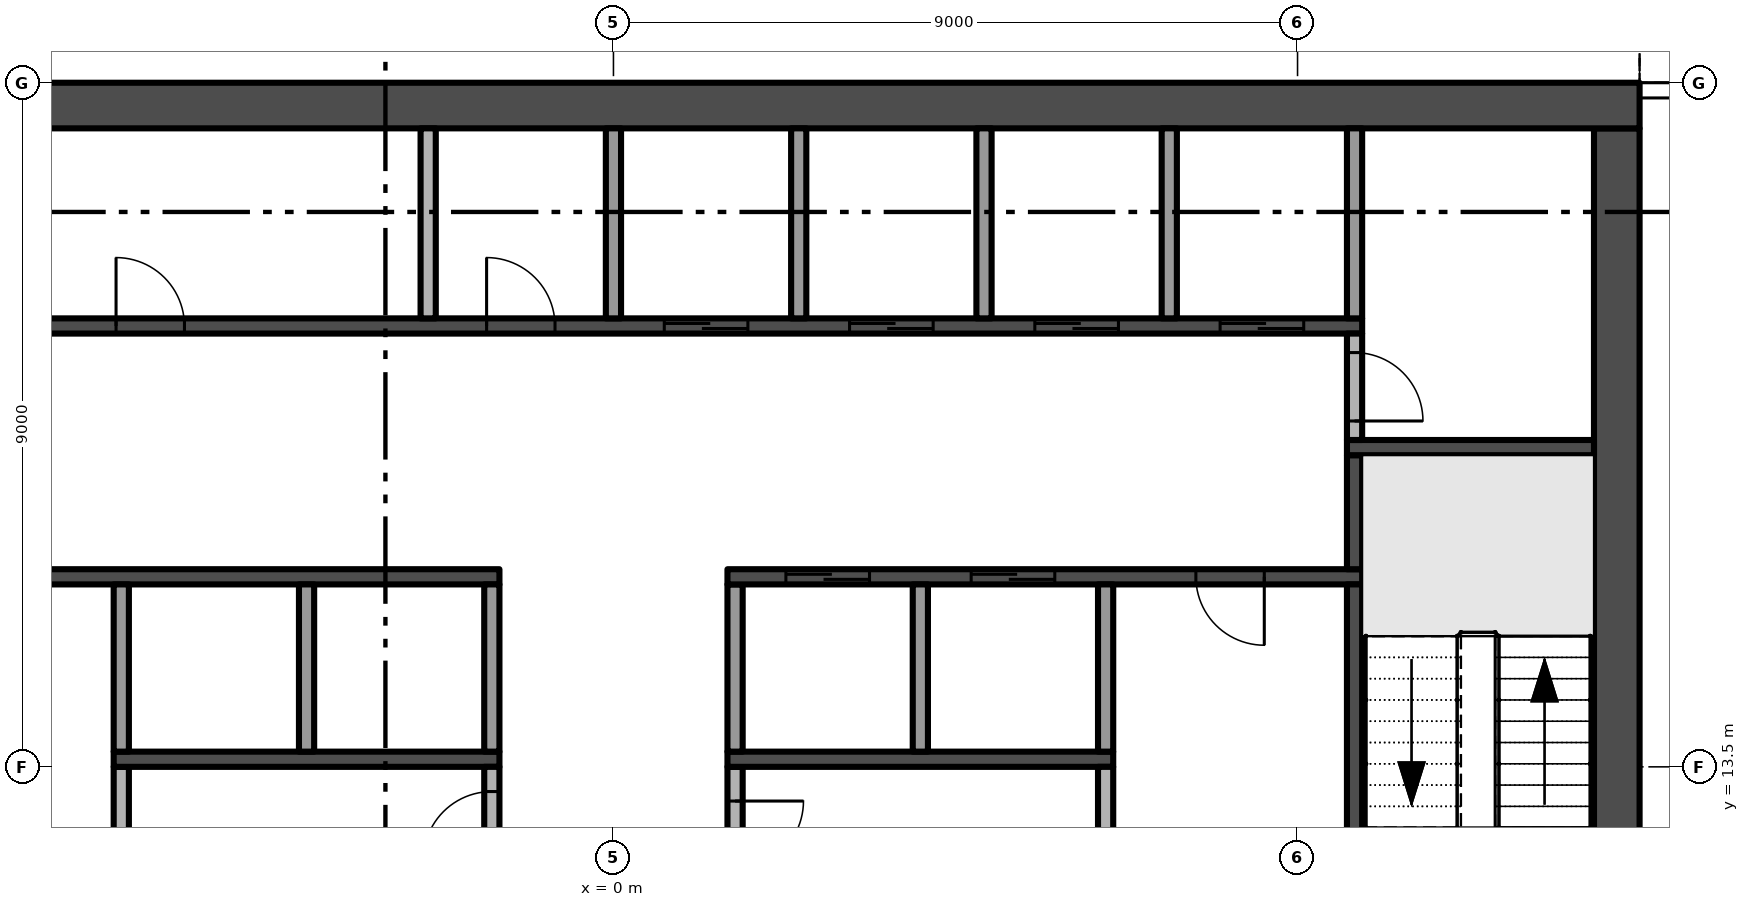
"""IFC4 building model, lengths in metres.
Left out: names, types, materials, properties, quantities, classifications, styles, units other than length and angle.
Written with IfcOpenShell. Run it as: python <this file> out.ifc"""

import sys

from ifc_helpers import new_model, si_unit, direction, frame, frame_2d, origin, place, context, subcontext, project, spatial, polyline, rectangle, outline, extrude, element, fill, save


model = new_model("IFC4")
c1 = context("Model", 3, precision=1e-05, world=origin(), true_north=direction((0.0, 1.0)))
c2 = subcontext(c1, "Body", "Model", "MODEL_VIEW")
j1 = project(units=[si_unit("LENGTHUNIT", "METRE"), si_unit("PLANEANGLEUNIT", "RADIAN")], contexts=[c1])
p1 = place(None, origin())
s1 = spatial("IfcSite", under=j1, at=p1, CompositionType="ELEMENT")
p2 = place(p1, origin())
s2 = spatial("IfcBuilding", under=s1, at=p2, CompositionType="ELEMENT")
p3 = place(p2, frame((0.0, 0.0, 284.4)))
s3 = spatial("IfcBuildingStorey", under=s2, at=p3, CompositionType="ELEMENT", Elevation=284.4)
p4 = place(p3, frame((13.2, 5.1, -0.3), z_axis=(0.0, 0.0, 1.0), x_axis=(0.0, 1.0, 0.0)))
e1 = element("IfcWall", 1, at=p4, inside=s3, PredefinedType="SHEAR", context=c2, shape_type="SweptSolid", body=[
    extrude(rectangle(XDim=16.8, YDim=0.6, at=frame_2d((8.4, 0.0))), origin(), (0.0, 0.0, 1.0), 5.0),
])
p5 = place(p4, frame((6.3, 0.0, 0.3)))
e2 = element("IfcOpeningElement", 2, at=p5, cuts=e1, PredefinedType="OPENING", context=c2, shape_type="SweptSolid", body=[
    extrude(rectangle(XDim=1.2, YDim=2.2, at=frame_2d((0.6, 1.1))), frame((0.0, 0.31, 0.0), z_axis=(0.0, -1.0, 0.0), x_axis=(1.0, 0.0, 0.0)), (0.0, 0.0, 1.0), 0.62),
])
p6 = place(p3, frame((13.5, 22.2, -0.3), z_axis=(0.0, 0.0, 1.0), x_axis=(-1.0, 0.0, 0.0)))
e3 = element("IfcWall", 3, at=p6, inside=s3, PredefinedType="SHEAR", context=c2, shape_type="SweptSolid", body=[
    extrude(rectangle(XDim=27.0, YDim=0.6, at=frame_2d((13.5, 0.0))), origin(), (0.0, 0.0, 1.0), 5.0),
])
p7 = place(p3, origin())
e4 = element("IfcWall", 4, at=p7, inside=s3, PredefinedType="USERDEFINED", context=c2, shape_type="SweptSolid", body=[
    extrude(outline(polyline([(22.5, 25.149), (21.0, 24.488), (19.5, 23.755), (18.0, 23.231), (16.875, 23.1), (16.5, 23.115), (15.0, 23.451), (13.5, 24.112), (13.399, 23.883), (14.921, 23.213), (16.467, 22.866), (16.885, 22.849), (18.056, 22.986), (19.596, 23.524), (21.105, 24.261), (22.601, 24.92), (22.5, 25.149)])), origin(), (0.0, 0.0, 1.0), 0.9),
])
p8 = place(p3, frame((-1.5, 16.0, 0.0), z_axis=(0.0, 0.0, 1.0), x_axis=(-1.0, 0.0, 0.0)))
e5 = element("IfcWall", 5, at=p8, inside=s3, PredefinedType="SHEAR", context=c2, shape_type="SweptSolid", body=[
    extrude(rectangle(XDim=8.35, YDim=0.2, at=frame_2d((4.175, 0.0))), origin(), (0.0, 0.0, 1.0), 4.7),
])
p9 = place(p8, frame((6.162, 0.0, 0.0)))
e6 = element("IfcOpeningElement", 6, at=p9, cuts=e5, PredefinedType="OPENING", context=c2, shape_type="SweptSolid", body=[
    extrude(rectangle(XDim=0.9, YDim=2.1, at=frame_2d((0.45, 1.05))), frame((0.0, 0.11, 0.0), z_axis=(0.0, -1.0, 0.0), x_axis=(1.0, 0.0, 0.0)), (0.0, 0.0, 1.0), 0.22),
])
p10 = place(p3, frame((-9.85, 19.3, 0.0), z_axis=(0.0, 0.0, 1.0), x_axis=(1.0, 0.0, 0.0)))
e7 = element("IfcWall", 7, at=p10, inside=s3, PredefinedType="SHEAR", context=c2, shape_type="SweptSolid", body=[
    extrude(rectangle(XDim=19.7, YDim=0.2, at=frame_2d((9.85, 0.0))), origin(), (0.0, 0.0, 1.0), 4.7),
])
p11 = place(p10, frame((10.519, 0.0, 0.0)))
e8 = element("IfcOpeningElement", 8, at=p11, cuts=e7, PredefinedType="OPENING", context=c2, shape_type="SweptSolid", body=[
    extrude(rectangle(XDim=1.1, YDim=2.1, at=frame_2d((0.55, 1.05))), frame((0.0, 0.11, 0.0), z_axis=(0.0, -1.0, 0.0), x_axis=(1.0, 0.0, 0.0)), (0.0, 0.0, 1.0), 0.22),
])
p12 = place(p10, frame((12.956, 0.0, 0.0)))
e9 = element("IfcOpeningElement", 9, at=p12, cuts=e7, PredefinedType="OPENING", context=c2, shape_type="SweptSolid", body=[
    extrude(rectangle(XDim=1.1, YDim=2.1, at=frame_2d((0.55, 1.05))), frame((0.0, 0.11, 0.0), z_axis=(0.0, -1.0, 0.0), x_axis=(1.0, 0.0, 0.0)), (0.0, 0.0, 1.0), 0.22),
])
p13 = place(p10, frame((15.394, 0.0, 0.0)))
e10 = element("IfcOpeningElement", 10, at=p13, cuts=e7, PredefinedType="OPENING", context=c2, shape_type="SweptSolid", body=[
    extrude(rectangle(XDim=1.1, YDim=2.1, at=frame_2d((0.55, 1.05))), frame((0.0, 0.11, 0.0), z_axis=(0.0, -1.0, 0.0), x_axis=(1.0, 0.0, 0.0)), (0.0, 0.0, 1.0), 0.22),
])
p14 = place(p10, frame((17.831, 0.0, 0.0)))
e11 = element("IfcOpeningElement", 11, at=p14, cuts=e7, PredefinedType="OPENING", context=c2, shape_type="SweptSolid", body=[
    extrude(rectangle(XDim=1.1, YDim=2.1, at=frame_2d((0.55, 1.05))), frame((0.0, 0.11, 0.0), z_axis=(0.0, -1.0, 0.0), x_axis=(1.0, 0.0, 0.0)), (0.0, 0.0, 1.0), 0.22),
])
p15 = place(p10, frame((3.306, 0.0, 0.0)))
e12 = element("IfcOpeningElement", 12, at=p15, cuts=e7, PredefinedType="OPENING", context=c2, shape_type="SweptSolid", body=[
    extrude(rectangle(XDim=0.9, YDim=2.1, at=frame_2d((0.45, 1.05))), frame((0.0, 0.11, 0.0), z_axis=(0.0, -1.0, 0.0), x_axis=(1.0, 0.0, 0.0)), (0.0, 0.0, 1.0), 0.22),
])
p16 = place(p10, frame((8.181, 0.0, 0.0)))
e13 = element("IfcOpeningElement", 13, at=p16, cuts=e7, PredefinedType="OPENING", context=c2, shape_type="SweptSolid", body=[
    extrude(rectangle(XDim=0.9, YDim=2.1, at=frame_2d((0.45, 1.05))), frame((0.0, 0.11, 0.0), z_axis=(0.0, -1.0, 0.0), x_axis=(1.0, 0.0, 0.0)), (0.0, 0.0, 1.0), 0.22),
])
p17 = place(p3, frame((-6.475, 11.95, 0.0), z_axis=(0.0, 0.0, 1.0), x_axis=(0.0, 1.0, 0.0)))
e14 = element("IfcWall", 14, at=p17, inside=s3, PredefinedType="PARTITIONING", context=c2, shape_type="SweptSolid", body=[
    extrude(rectangle(XDim=1.55, YDim=0.2, at=frame_2d((0.775, 0.0))), origin(), (0.0, 0.0, 1.0), 4.7),
])
p18 = place(p3, frame((-6.575, 13.6, 0.0), z_axis=(0.0, 0.0, 1.0), x_axis=(1.0, 0.0, 0.0)))
e15 = element("IfcWall", 15, at=p18, inside=s3, PredefinedType="SHEAR", context=c2, shape_type="SweptSolid", body=[
    extrude(rectangle(XDim=5.075, YDim=0.2, at=frame_2d((2.538, 0.0))), origin(), (0.0, 0.0, 1.0), 4.7),
])
for number, where, z_axis, x_axis in (
    (16, (-6.475, 13.7, 0.0), (0.0, 0.0, 1.0), (0.0, 1.0, 0.0)),
    (17, (-4.037, 13.7, 0.0), (0.0, 0.0, 1.0), (0.0, 1.0, 0.0)),
):
    element("IfcWall", number, at=place(p3, frame(where, z_axis=z_axis, x_axis=x_axis)), inside=s3, PredefinedType="PARTITIONING", context=c2, shape_type="SweptSolid", body=[
        extrude(rectangle(XDim=2.2, YDim=0.2, at=frame_2d((1.1, 0.0))), origin(), (0.0, 0.0, 1.0), 4.7),
    ])
p19 = place(p3, frame((-2.438, 19.4, 0.0), z_axis=(0.0, 0.0, 1.0), x_axis=(0.0, 1.0, 0.0)))
e18 = element("IfcWall", 18, at=p19, inside=s3, PredefinedType="PARTITIONING", context=c2, shape_type="SweptSolid", body=[
    extrude(rectangle(XDim=2.5, YDim=0.2, at=frame_2d((1.25, 0.0))), origin(), (0.0, 0.0, 1.0), 4.7),
])
p20 = place(p3, frame((-1.6, 11.95, 0.0), z_axis=(0.0, 0.0, 1.0), x_axis=(0.0, 1.0, 0.0)))
e19 = element("IfcWall", 19, at=p20, inside=s3, PredefinedType="PARTITIONING", context=c2, shape_type="SweptSolid", body=[
    extrude(rectangle(XDim=1.55, YDim=0.2, at=frame_2d((0.775, 0.0))), origin(), (0.0, 0.0, 1.0), 4.7),
])
p21 = place(p20, frame((0.325, 0.0, 0.0)))
e20 = element("IfcOpeningElement", 20, at=p21, cuts=e19, PredefinedType="OPENING", context=c2, shape_type="SweptSolid", body=[
    extrude(rectangle(XDim=0.9, YDim=2.1, at=frame_2d((0.45, 1.05))), frame((0.0, 0.11, 0.0), z_axis=(0.0, -1.0, 0.0), x_axis=(1.0, 0.0, 0.0)), (0.0, 0.0, 1.0), 0.22),
])
p22 = place(p3, frame((-1.6, 13.7, 0.0), z_axis=(0.0, 0.0, 1.0), x_axis=(0.0, 1.0, 0.0)))
e21 = element("IfcWall", 21, at=p22, inside=s3, PredefinedType="PARTITIONING", context=c2, shape_type="SweptSolid", body=[
    extrude(rectangle(XDim=2.2, YDim=0.2, at=frame_2d((1.1, 0.0))), origin(), (0.0, 0.0, 1.0), 4.7),
])
p23 = place(p3, frame((0.0, 19.4, 0.0), z_axis=(0.0, 0.0, 1.0), x_axis=(0.0, 1.0, 0.0)))
e22 = element("IfcWall", 22, at=p23, inside=s3, PredefinedType="PARTITIONING", context=c2, shape_type="SweptSolid", body=[
    extrude(rectangle(XDim=2.5, YDim=0.2, at=frame_2d((1.25, 0.0))), origin(), (0.0, 0.0, 1.0), 4.7),
])
p24 = place(p3, frame((1.6, 13.5, 0.0), z_axis=(0.0, 0.0, 1.0), x_axis=(0.0, -1.0, 0.0)))
e23 = element("IfcWall", 23, at=p24, inside=s3, PredefinedType="PARTITIONING", context=c2, shape_type="SweptSolid", body=[
    extrude(rectangle(XDim=1.8, YDim=0.2, at=frame_2d((0.9, 0.0))), origin(), (0.0, 0.0, 1.0), 4.7),
])
p25 = place(p24, frame((0.45, 0.0, 0.0)))
e24 = element("IfcOpeningElement", 24, at=p25, cuts=e23, PredefinedType="OPENING", context=c2, shape_type="SweptSolid", body=[
    extrude(rectangle(XDim=0.9, YDim=2.1, at=frame_2d((0.45, 1.05))), frame((0.0, 0.11, 0.0), z_axis=(0.0, -1.0, 0.0), x_axis=(1.0, 0.0, 0.0)), (0.0, 0.0, 1.0), 0.22),
])
p26 = place(p3, frame((1.5, 13.6, 0.0), z_axis=(0.0, 0.0, 1.0), x_axis=(1.0, 0.0, 0.0)))
e25 = element("IfcWall", 25, at=p26, inside=s3, PredefinedType="SHEAR", context=c2, shape_type="SweptSolid", body=[
    extrude(rectangle(XDim=5.075, YDim=0.2, at=frame_2d((2.538, 0.0))), origin(), (0.0, 0.0, 1.0), 4.7),
])
p27 = place(p3, frame((1.6, 13.7, 0.0), z_axis=(0.0, 0.0, 1.0), x_axis=(0.0, 1.0, 0.0)))
e26 = element("IfcWall", 26, at=p27, inside=s3, PredefinedType="PARTITIONING", context=c2, shape_type="SweptSolid", body=[
    extrude(rectangle(XDim=2.2, YDim=0.2, at=frame_2d((1.1, 0.0))), origin(), (0.0, 0.0, 1.0), 4.7),
])
p28 = place(p3, frame((9.85, 16.0, 0.0), z_axis=(0.0, 0.0, 1.0), x_axis=(-1.0, 0.0, 0.0)))
e27 = element("IfcWall", 27, at=p28, inside=s3, PredefinedType="SHEAR", context=c2, shape_type="SweptSolid", body=[
    extrude(rectangle(XDim=8.35, YDim=0.2, at=frame_2d((4.175, 0.0))), origin(), (0.0, 0.0, 1.0), 4.7),
])
p29 = place(p28, frame((6.481, 0.0, 0.0)))
e28 = element("IfcOpeningElement", 28, at=p29, cuts=e27, PredefinedType="OPENING", context=c2, shape_type="SweptSolid", body=[
    extrude(rectangle(XDim=1.1, YDim=2.1, at=frame_2d((0.55, 1.05))), frame((0.0, 0.11, 0.0), z_axis=(0.0, -1.0, 0.0), x_axis=(1.0, 0.0, 0.0)), (0.0, 0.0, 1.0), 0.22),
])
p30 = place(p28, frame((4.044, 0.0, 0.0)))
e29 = element("IfcOpeningElement", 29, at=p30, cuts=e27, PredefinedType="OPENING", context=c2, shape_type="SweptSolid", body=[
    extrude(rectangle(XDim=1.1, YDim=2.1, at=frame_2d((0.55, 1.05))), frame((0.0, 0.11, 0.0), z_axis=(0.0, -1.0, 0.0), x_axis=(1.0, 0.0, 0.0)), (0.0, 0.0, 1.0), 0.22),
])
p31 = place(p28, frame((1.288, 0.0, 0.0)))
e30 = element("IfcOpeningElement", 30, at=p31, cuts=e27, PredefinedType="OPENING", context=c2, shape_type="SweptSolid", body=[
    extrude(rectangle(XDim=0.9, YDim=2.1, at=frame_2d((0.45, 1.05))), frame((0.0, 0.11, 0.0), z_axis=(0.0, -1.0, 0.0), x_axis=(1.0, 0.0, 0.0)), (0.0, 0.0, 1.0), 0.22),
])
p32 = place(p3, frame((2.438, 19.4, 0.0), z_axis=(0.0, 0.0, 1.0), x_axis=(0.0, 1.0, 0.0)))
e31 = element("IfcWall", 31, at=p32, inside=s3, PredefinedType="PARTITIONING", context=c2, shape_type="SweptSolid", body=[
    extrude(rectangle(XDim=2.5, YDim=0.2, at=frame_2d((1.25, 0.0))), origin(), (0.0, 0.0, 1.0), 4.7),
])
p33 = place(p3, frame((4.037, 13.7, 0.0), z_axis=(0.0, 0.0, 1.0), x_axis=(0.0, 1.0, 0.0)))
e32 = element("IfcWall", 32, at=p33, inside=s3, PredefinedType="PARTITIONING", context=c2, shape_type="SweptSolid", body=[
    extrude(rectangle(XDim=2.2, YDim=0.2, at=frame_2d((1.1, 0.0))), origin(), (0.0, 0.0, 1.0), 4.7),
])
p34 = place(p3, frame((4.875, 19.4, 0.0), z_axis=(0.0, 0.0, 1.0), x_axis=(0.0, 1.0, 0.0)))
e33 = element("IfcWall", 33, at=p34, inside=s3, PredefinedType="PARTITIONING", context=c2, shape_type="SweptSolid", body=[
    extrude(rectangle(XDim=2.5, YDim=0.2, at=frame_2d((1.25, 0.0))), origin(), (0.0, 0.0, 1.0), 4.7),
])
p35 = place(p3, frame((6.475, 12.3, 0.0), z_axis=(0.0, 0.0, 1.0), x_axis=(0.0, 1.0, 0.0)))
e34 = element("IfcWall", 34, at=p35, inside=s3, PredefinedType="PARTITIONING", context=c2, shape_type="SweptSolid", body=[
    extrude(rectangle(XDim=1.2, YDim=0.2, at=frame_2d((0.6, 0.0))), origin(), (0.0, 0.0, 1.0), 4.7),
])
p36 = place(p3, frame((6.475, 13.7, 0.0), z_axis=(0.0, 0.0, 1.0), x_axis=(0.0, 1.0, 0.0)))
e35 = element("IfcWall", 35, at=p36, inside=s3, PredefinedType="PARTITIONING", context=c2, shape_type="SweptSolid", body=[
    extrude(rectangle(XDim=2.2, YDim=0.2, at=frame_2d((1.1, 0.0))), origin(), (0.0, 0.0, 1.0), 4.7),
])
p37 = place(p3, frame((7.312, 19.4, 0.0), z_axis=(0.0, 0.0, 1.0), x_axis=(0.0, 1.0, 0.0)))
e36 = element("IfcWall", 36, at=p37, inside=s3, PredefinedType="PARTITIONING", context=c2, shape_type="SweptSolid", body=[
    extrude(rectangle(XDim=2.5, YDim=0.2, at=frame_2d((1.25, 0.0))), origin(), (0.0, 0.0, 1.0), 4.7),
])
p38 = place(p3, frame((9.75, 12.3, 0.0), z_axis=(0.0, 0.0, 1.0), x_axis=(0.0, 1.0, 0.0)))
e37 = element("IfcWall", 37, at=p38, inside=s3, PredefinedType="SHEAR", context=c2, shape_type="SweptSolid", body=[
    extrude(rectangle(XDim=3.6, YDim=0.2, at=frame_2d((1.8, 0.0))), origin(), (0.0, 0.0, 1.0), 4.7),
])
p39 = place(p3, frame((9.75, 16.1, 0.0), z_axis=(0.0, 0.0, 1.0), x_axis=(0.0, 1.0, 0.0)))
e38 = element("IfcWall", 38, at=p39, inside=s3, PredefinedType="SHEAR", context=c2, shape_type="SweptSolid", body=[
    extrude(rectangle(XDim=1.5, YDim=0.2, at=frame_2d((0.75, 0.0))), origin(), (0.0, 0.0, 1.0), 4.7),
])
p40 = place(p3, frame((9.65, 17.7, 0.0), z_axis=(0.0, 0.0, 1.0), x_axis=(1.0, 0.0, 0.0)))
e39 = element("IfcWall", 39, at=p40, inside=s3, PredefinedType="SHEAR", context=c2, shape_type="SweptSolid", body=[
    extrude(rectangle(XDim=3.25, YDim=0.2, at=frame_2d((1.625, 0.0))), origin(), (0.0, 0.0, 1.0), 4.7),
])
p41 = place(p3, frame((9.75, 19.2, 0.0), z_axis=(0.0, 0.0, 1.0), x_axis=(0.0, -1.0, 0.0)))
e40 = element("IfcWall", 40, at=p41, inside=s3, PredefinedType="PARTITIONING", context=c2, shape_type="SweptSolid", body=[
    extrude(rectangle(XDim=1.4, YDim=0.2, at=frame_2d((0.7, 0.0))), origin(), (0.0, 0.0, 1.0), 4.7),
])
p42 = place(p41, frame((0.25, 0.0, 0.0)))
e41 = element("IfcOpeningElement", 41, at=p42, cuts=e40, PredefinedType="OPENING", context=c2, shape_type="SweptSolid", body=[
    extrude(rectangle(XDim=0.9, YDim=2.1, at=frame_2d((0.45, 1.05))), frame((0.0, 0.11, 0.0), z_axis=(0.0, -1.0, 0.0), x_axis=(1.0, 0.0, 0.0)), (0.0, 0.0, 1.0), 0.22),
])
p43 = place(p3, frame((9.75, 19.4, 0.0), z_axis=(0.0, 0.0, 1.0), x_axis=(0.0, 1.0, 0.0)))
e42 = element("IfcWall", 42, at=p43, inside=s3, PredefinedType="PARTITIONING", context=c2, shape_type="SweptSolid", body=[
    extrude(rectangle(XDim=2.5, YDim=0.2, at=frame_2d((1.25, 0.0))), origin(), (0.0, 0.0, 1.0), 4.7),
])
p44 = place(p11, origin())
e43 = element("IfcDoor", 43, at=p44, inside=s3, OperationType="SLIDING_TO_RIGHT", PredefinedType="DOOR", context=c2, shape_type="SweptSolid", body=[
    extrude(rectangle(XDim=1.1, YDim=2.1, at=frame_2d((0.55, 1.05))), frame((0.0, 0.025, 0.0), z_axis=(0.0, -1.0, 0.0), x_axis=(1.0, 0.0, 0.0)), (0.0, 0.0, 1.0), 0.05),
])
fill(e8, e43)
p45 = place(p12, origin())
e44 = element("IfcDoor", 44, at=p45, inside=s3, OperationType="SLIDING_TO_RIGHT", PredefinedType="DOOR", context=c2, shape_type="SweptSolid", body=[
    extrude(rectangle(XDim=1.1, YDim=2.1, at=frame_2d((0.55, 1.05))), frame((0.0, 0.025, 0.0), z_axis=(0.0, -1.0, 0.0), x_axis=(1.0, 0.0, 0.0)), (0.0, 0.0, 1.0), 0.05),
])
fill(e9, e44)
p46 = place(p13, origin())
e45 = element("IfcDoor", 45, at=p46, inside=s3, OperationType="SLIDING_TO_RIGHT", PredefinedType="DOOR", context=c2, shape_type="SweptSolid", body=[
    extrude(rectangle(XDim=1.1, YDim=2.1, at=frame_2d((0.55, 1.05))), frame((0.0, 0.025, 0.0), z_axis=(0.0, -1.0, 0.0), x_axis=(1.0, 0.0, 0.0)), (0.0, 0.0, 1.0), 0.05),
])
fill(e10, e45)
p47 = place(p14, origin())
e46 = element("IfcDoor", 46, at=p47, inside=s3, OperationType="SLIDING_TO_RIGHT", PredefinedType="DOOR", context=c2, shape_type="SweptSolid", body=[
    extrude(rectangle(XDim=1.1, YDim=2.1, at=frame_2d((0.55, 1.05))), frame((0.0, 0.025, 0.0), z_axis=(0.0, -1.0, 0.0), x_axis=(1.0, 0.0, 0.0)), (0.0, 0.0, 1.0), 0.05),
])
fill(e11, e46)
p48 = place(p29, origin())
e47 = element("IfcDoor", 47, at=p48, inside=s3, OperationType="SLIDING_TO_RIGHT", PredefinedType="DOOR", context=c2, shape_type="SweptSolid", body=[
    extrude(rectangle(XDim=1.1, YDim=2.1, at=frame_2d((0.55, 1.05))), frame((0.0, 0.025, 0.0), z_axis=(0.0, -1.0, 0.0), x_axis=(1.0, 0.0, 0.0)), (0.0, 0.0, 1.0), 0.05),
])
fill(e28, e47)
p49 = place(p30, origin())
e48 = element("IfcDoor", 48, at=p49, inside=s3, OperationType="SLIDING_TO_RIGHT", PredefinedType="DOOR", context=c2, shape_type="SweptSolid", body=[
    extrude(rectangle(XDim=1.1, YDim=2.1, at=frame_2d((0.55, 1.05))), frame((0.0, 0.025, 0.0), z_axis=(0.0, -1.0, 0.0), x_axis=(1.0, 0.0, 0.0)), (0.0, 0.0, 1.0), 0.05),
])
fill(e29, e48)
p50 = place(p21, origin())
e49 = element("IfcDoor", 49, at=p50, inside=s3, OperationType="SINGLE_SWING_LEFT", PredefinedType="DOOR", context=c2, shape_type="SweptSolid", body=[
    extrude(rectangle(XDim=0.9, YDim=2.1, at=frame_2d((0.45, 1.05))), frame((0.0, 0.025, 0.0), z_axis=(0.0, -1.0, 0.0), x_axis=(1.0, 0.0, 0.0)), (0.0, 0.0, 1.0), 0.05),
])
fill(e20, e49)
p51 = place(p25, origin())
e50 = element("IfcDoor", 50, at=p51, inside=s3, OperationType="SINGLE_SWING_LEFT", PredefinedType="DOOR", context=c2, shape_type="SweptSolid", body=[
    extrude(rectangle(XDim=0.9, YDim=2.1, at=frame_2d((0.45, 1.05))), frame((0.0, 0.025, 0.0), z_axis=(0.0, -1.0, 0.0), x_axis=(1.0, 0.0, 0.0)), (0.0, 0.0, 1.0), 0.05),
])
fill(e24, e50)
p52 = place(p31, origin())
e51 = element("IfcDoor", 51, at=p52, inside=s3, OperationType="SINGLE_SWING_LEFT", PredefinedType="DOOR", context=c2, shape_type="SweptSolid", body=[
    extrude(rectangle(XDim=0.9, YDim=2.1, at=frame_2d((0.45, 1.05))), frame((0.0, 0.025, 0.0), z_axis=(0.0, -1.0, 0.0), x_axis=(1.0, 0.0, 0.0)), (0.0, 0.0, 1.0), 0.05),
])
fill(e30, e51)
p53 = place(p42, origin())
e52 = element("IfcDoor", 52, at=p53, inside=s3, OperationType="SINGLE_SWING_RIGHT", PredefinedType="DOOR", context=c2, shape_type="SweptSolid", body=[
    extrude(rectangle(XDim=0.9, YDim=2.1, at=frame_2d((0.45, 1.05))), frame((0.0, 0.025, 0.0), z_axis=(0.0, -1.0, 0.0), x_axis=(1.0, 0.0, 0.0)), (0.0, 0.0, 1.0), 0.05),
])
fill(e41, e52)
p54 = place(p15, origin())
e53 = element("IfcDoor", 53, at=p54, inside=s3, OperationType="SINGLE_SWING_LEFT", PredefinedType="DOOR", context=c2, shape_type="SweptSolid", body=[
    extrude(rectangle(XDim=0.9, YDim=2.1, at=frame_2d((0.45, 1.05))), frame((0.0, 0.025, 0.0), z_axis=(0.0, -1.0, 0.0), x_axis=(1.0, 0.0, 0.0)), (0.0, 0.0, 1.0), 0.05),
])
fill(e12, e53)
p55 = place(p16, origin())
e54 = element("IfcDoor", 54, at=p55, inside=s3, OperationType="SINGLE_SWING_LEFT", PredefinedType="DOOR", context=c2, shape_type="SweptSolid", body=[
    extrude(rectangle(XDim=0.9, YDim=2.1, at=frame_2d((0.45, 1.05))), frame((0.0, 0.025, 0.0), z_axis=(0.0, -1.0, 0.0), x_axis=(1.0, 0.0, 0.0)), (0.0, 0.0, 1.0), 0.05),
])
fill(e13, e54)
save(model, sys.argv[1])
